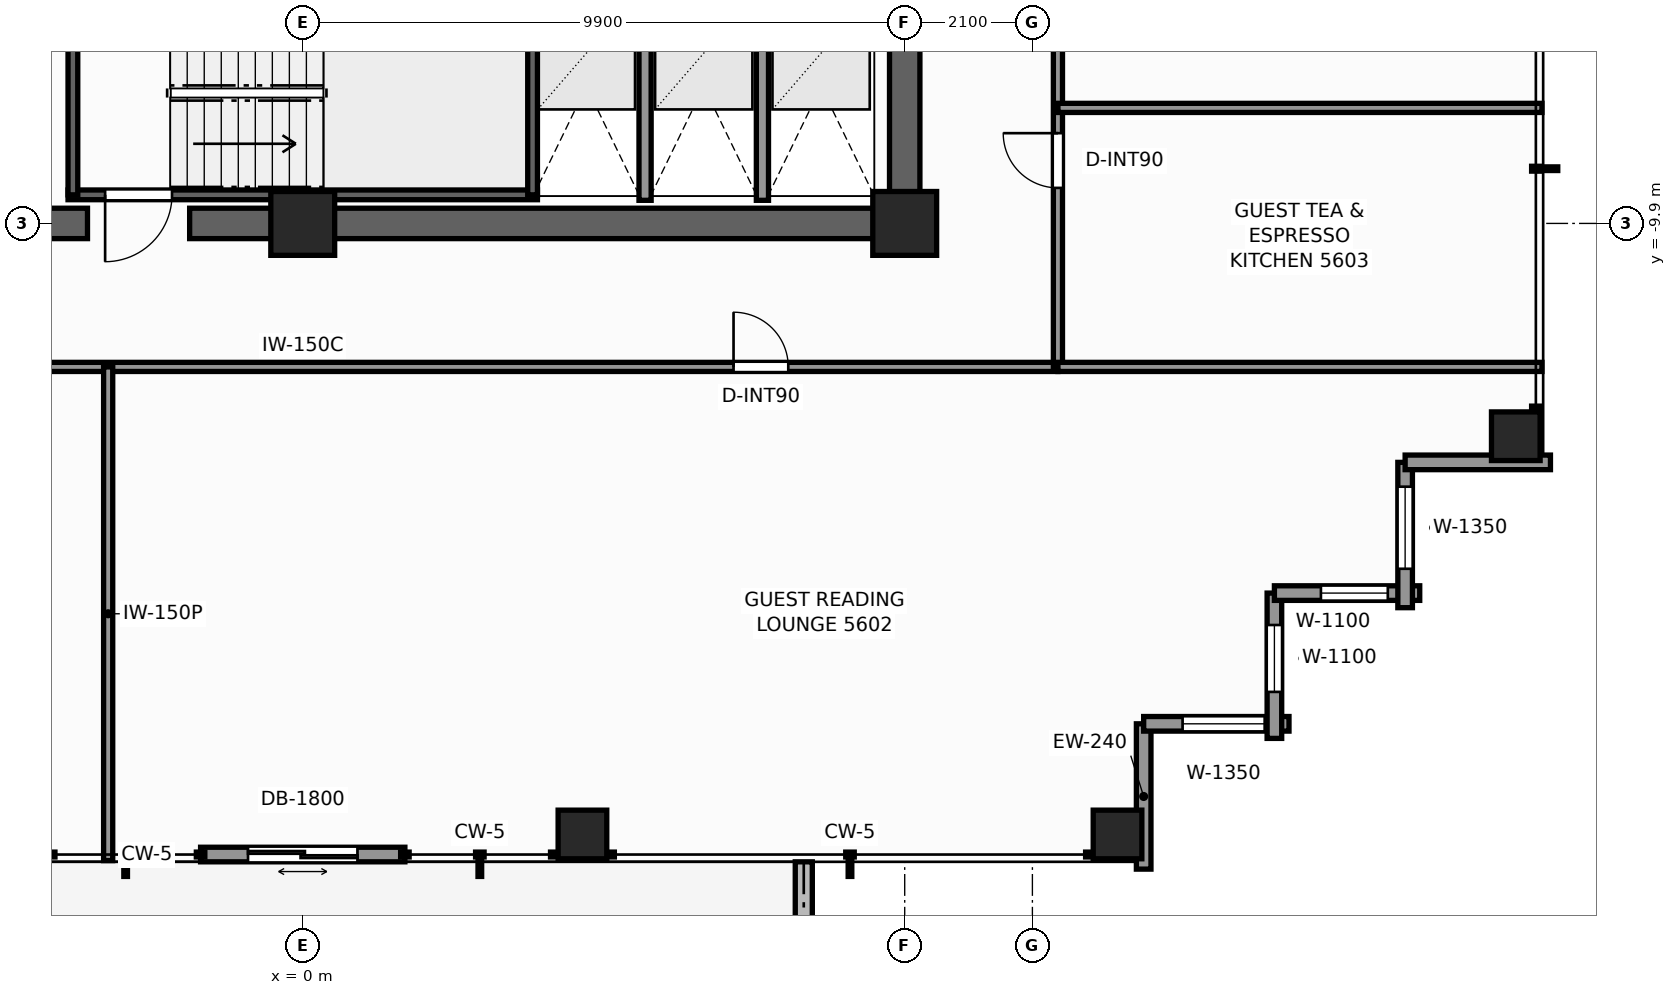
"""IFC4 building model, lengths in metres.
Left out: names, types, materials, properties, quantities, classifications, styles, units other than length and angle.
Written with IfcOpenShell. Run it as: python <this file> out.ifc"""

import sys

from ifc_helpers import new_model, si_unit, direction, frame, frame_2d, origin, origin_2d, place, context, subcontext, project, spatial, rectangle, extrude, element, fill, save


model = new_model("IFC4")
c1 = context("Model", 3, precision=1e-05, world=origin(), true_north=direction((0.0, 1.0)))
c2 = subcontext(c1, "Body", "Model", "MODEL_VIEW")
j1 = project(units=[si_unit("LENGTHUNIT", "METRE"), si_unit("PLANEANGLEUNIT", "RADIAN")], contexts=[c1])
p1 = place(None, origin())
s1 = spatial("IfcSite", under=j1, at=p1, CompositionType="ELEMENT")
p2 = place(p1, origin())
s2 = spatial("IfcBuilding", under=s1, at=p2, CompositionType="ELEMENT")
p3 = place(p2, frame((0.0, 0.0, 193.2)))
s3 = spatial("IfcBuildingStorey", under=s2, at=p3, CompositionType="ELEMENT", Elevation=193.2)
p4 = place(p3, frame((10.15, -9.9, 0.0), z_axis=(0.0, 0.0, 1.0), x_axis=(-1.0, 0.0, 0.0)))
e1 = element("IfcWall", 1, at=p4, inside=s3, PredefinedType="SHEAR", context=c2, shape_type="SweptSolid", body=[
    extrude(rectangle(XDim=12.01, YDim=0.5, at=frame_2d((6.005, 0.0))), origin(), (0.0, 0.0, 1.0), 3.3),
])
p5 = place(p3, frame((-3.54, -9.9, 0.0), z_axis=(0.0, 0.0, 1.0), x_axis=(-1.0, 0.0, 0.0)))
e2 = element("IfcWall", 2, at=p5, inside=s3, PredefinedType="SHEAR", context=c2, shape_type="SweptSolid", body=[
    extrude(rectangle(XDim=6.61, YDim=0.5, at=frame_2d((3.305, 0.0))), origin(), (0.0, 0.0, 1.0), 3.3),
])
p6 = place(p3, frame((9.9, -9.65, 0.0), z_axis=(0.0, 0.0, 1.0), x_axis=(0.0, 1.0, 0.0)))
e3 = element("IfcWall", 3, at=p6, inside=s3, PredefinedType="SHEAR", context=c2, shape_type="SweptSolid", body=[
    extrude(rectangle(XDim=4.1, YDim=0.5, at=frame_2d((2.05, 0.0))), origin(), (0.0, 0.0, 1.0), 3.3),
])
for number, where, z_axis, x_axis in (
    (4, (9.9, -9.9, 0.0), (0.0, 0.0, 1.0), (1.0, 0.0, 0.0)),
    (5, (0.0, -9.9, 0.0), (0.0, 0.0, 1.0), (1.0, 0.0, 0.0)),
):
    element("IfcColumn", number, at=place(p3, frame(where, z_axis=z_axis, x_axis=x_axis)), inside=s3, PredefinedType="COLUMN", context=c2, shape_type="SweptSolid", body=[
        extrude(rectangle(XDim=1.05, YDim=1.05, at=origin_2d()), origin(), (0.0, 0.0, 1.0), 3.3),
    ])
for number, where, z_axis, x_axis in (
    (6, (4.6, -19.95, 0.0), (0.0, 0.0, 1.0), (1.0, 0.0, 0.0)),
    (7, (13.4, -19.95, 0.0), (0.0, 0.0, 1.0), (1.0, 0.0, 0.0)),
    (8, (19.95, -13.4, 0.0), (0.0, 0.0, 1.0), (1.0, 0.0, 0.0)),
):
    element("IfcColumn", number, at=place(p3, frame(where, z_axis=z_axis, x_axis=x_axis)), inside=s3, PredefinedType="COLUMN", context=c2, shape_type="SweptSolid", body=[
        extrude(rectangle(XDim=0.8, YDim=0.8, at=origin_2d()), origin(), (0.0, 0.0, 1.0), 3.3),
    ])
p7 = place(p3, frame((8.24, -23.82, -0.04), z_axis=(0.0, 0.0, 1.0), x_axis=(0.0, 1.0, 0.0)))
e9 = element("IfcWall", 9, at=p7, inside=s3, PredefinedType="PARAPET", context=c2, shape_type="SweptSolid", body=[
    extrude(rectangle(XDim=3.42, YDim=0.28, at=frame_2d((1.71, 0.0))), origin(), (0.0, 0.0, 1.0), 0.42),
])
p8 = place(p3, frame((1.68, -20.28, 0.0), z_axis=(0.0, 0.0, 1.0), x_axis=(-1.0, 0.0, 0.0)))
e10 = element("IfcWall", 10, at=p8, inside=s3, PredefinedType="STANDARD", context=c2, shape_type="SweptSolid", body=[
    extrude(rectangle(XDim=3.36, YDim=0.24, at=frame_2d((1.68, 0.0))), origin(), (0.0, 0.0, 1.0), 3.08),
])
p9 = place(p8, frame((0.78, 0.0, 0.0)))
e11 = element("IfcOpeningElement", 11, at=p9, cuts=e10, PredefinedType="OPENING", context=c2, shape_type="SweptSolid", body=[
    extrude(rectangle(XDim=1.8, YDim=2.2, at=frame_2d((0.9, 1.1))), frame((0.0, 0.13, 0.0), z_axis=(0.0, -1.0, 0.0), x_axis=(1.0, 0.0, 0.0)), (0.0, 0.0, 1.0), 0.26),
])
p10 = place(p3, frame((13.83, -18.13, 0.0), z_axis=(0.0, 0.0, 1.0), x_axis=(0.0, -1.0, 0.0)))
e12 = element("IfcWall", 12, at=p10, inside=s3, PredefinedType="STANDARD", context=c2, shape_type="SweptSolid", body=[
    extrude(rectangle(XDim=2.39, YDim=0.24, at=frame_2d((1.195, 0.0))), origin(), (0.0, 0.0, 1.0), 2.463),
])
p11 = place(p3, frame((16.22, -18.13, 0.0), z_axis=(0.0, 0.0, 1.0), x_axis=(-1.0, 0.0, 0.0)))
e13 = element("IfcWall", 13, at=p11, inside=s3, PredefinedType="STANDARD", context=c2, shape_type="SweptSolid", body=[
    extrude(rectangle(XDim=2.39, YDim=0.24, at=frame_2d((1.195, 0.0))), origin(), (0.0, 0.0, 1.0), 2.463),
])
p12 = place(p11, frame((0.4, 0.0, 0.65)))
e14 = element("IfcOpeningElement", 14, at=p12, cuts=e13, PredefinedType="OPENING", context=c2, shape_type="SweptSolid", body=[
    extrude(rectangle(XDim=1.35, YDim=1.55, at=frame_2d((0.675, 0.775))), frame((0.0, 0.13, 0.0), z_axis=(0.0, -1.0, 0.0), x_axis=(1.0, 0.0, 0.0)), (0.0, 0.0, 1.0), 0.26),
])
p13 = place(p3, frame((15.98, -15.98, 0.0), z_axis=(0.0, 0.0, 1.0), x_axis=(0.0, -1.0, 0.0)))
e15 = element("IfcWall", 15, at=p13, inside=s3, PredefinedType="STANDARD", context=c2, shape_type="SweptSolid", body=[
    extrude(rectangle(XDim=2.39, YDim=0.24, at=frame_2d((1.195, 0.0))), origin(), (0.0, 0.0, 1.0), 2.463),
])
p14 = place(p13, frame((0.525, 0.0, 0.65)))
e16 = element("IfcOpeningElement", 16, at=p14, cuts=e15, PredefinedType="OPENING", context=c2, shape_type="SweptSolid", body=[
    extrude(rectangle(XDim=1.1, YDim=1.45, at=frame_2d((0.55, 0.725))), frame((0.0, 0.13, 0.0), z_axis=(0.0, -1.0, 0.0), x_axis=(1.0, 0.0, 0.0)), (0.0, 0.0, 1.0), 0.26),
])
p15 = place(p3, frame((18.37, -15.98, 0.0), z_axis=(0.0, 0.0, 1.0), x_axis=(-1.0, 0.0, 0.0)))
e17 = element("IfcWall", 17, at=p15, inside=s3, PredefinedType="STANDARD", context=c2, shape_type="SweptSolid", body=[
    extrude(rectangle(XDim=2.39, YDim=0.24, at=frame_2d((1.195, 0.0))), origin(), (0.0, 0.0, 1.0), 2.463),
])
p16 = place(p15, frame((0.525, 0.0, 0.65)))
e18 = element("IfcOpeningElement", 18, at=p16, cuts=e17, PredefinedType="OPENING", context=c2, shape_type="SweptSolid", body=[
    extrude(rectangle(XDim=1.1, YDim=1.45, at=frame_2d((0.55, 0.725))), frame((0.0, 0.13, 0.0), z_axis=(0.0, -1.0, 0.0), x_axis=(1.0, 0.0, 0.0)), (0.0, 0.0, 1.0), 0.26),
])
p17 = place(p3, frame((18.13, -13.83, 0.0), z_axis=(0.0, 0.0, 1.0), x_axis=(0.0, -1.0, 0.0)))
e19 = element("IfcWall", 19, at=p17, inside=s3, PredefinedType="STANDARD", context=c2, shape_type="SweptSolid", body=[
    extrude(rectangle(XDim=2.39, YDim=0.24, at=frame_2d((1.195, 0.0))), origin(), (0.0, 0.0, 1.0), 2.463),
])
p18 = place(p17, frame((0.4, 0.0, 0.65)))
e20 = element("IfcOpeningElement", 20, at=p18, cuts=e19, PredefinedType="OPENING", context=c2, shape_type="SweptSolid", body=[
    extrude(rectangle(XDim=1.35, YDim=1.55, at=frame_2d((0.675, 0.775))), frame((0.0, 0.13, 0.0), z_axis=(0.0, -1.0, 0.0), x_axis=(1.0, 0.0, 0.0)), (0.0, 0.0, 1.0), 0.26),
])
p19 = place(p3, frame((20.52, -13.83, 0.0), z_axis=(0.0, 0.0, 1.0), x_axis=(-1.0, 0.0, 0.0)))
e21 = element("IfcWall", 21, at=p19, inside=s3, PredefinedType="STANDARD", context=c2, shape_type="SweptSolid", body=[
    extrude(rectangle(XDim=2.39, YDim=0.24, at=frame_2d((1.195, 0.0))), origin(), (0.0, 0.0, 1.0), 2.463),
])
p20 = place(p3, frame((3.86, -9.43, 0.0), z_axis=(0.0, 0.0, 1.0), x_axis=(-1.0, 0.0, 0.0)))
e22 = element("IfcWall", 22, at=p20, inside=s3, PredefinedType="SHEAR", context=c2, shape_type="SweptSolid", body=[
    extrude(rectangle(XDim=7.72, YDim=0.16, at=frame_2d((3.86, 0.0))), origin(), (0.0, 0.0, 1.0), 3.3),
])
p21 = place(p20, frame((6.01, 0.0, 0.0)))
e23 = element("IfcOpeningElement", 23, at=p21, cuts=e22, PredefinedType="OPENING", context=c2, shape_type="SweptSolid", body=[
    extrude(rectangle(XDim=1.1, YDim=2.2, at=frame_2d((0.55, 1.1))), frame((0.0, 0.09, 0.0), z_axis=(0.0, -1.0, 0.0), x_axis=(1.0, 0.0, 0.0)), (0.0, 0.0, 1.0), 0.18),
])
for number, where, z_axis, x_axis in (
    (24, (-3.78, -9.43, 0.0), (0.0, 0.0, 1.0), (0.0, 1.0, 0.0)),
    (25, (3.78, -9.43, 0.0), (0.0, 0.0, 1.0), (0.0, 1.0, 0.0)),
):
    element("IfcWall", number, at=place(p3, frame(where, z_axis=z_axis, x_axis=x_axis)), inside=s3, PredefinedType="SHEAR", context=c2, shape_type="SweptSolid", body=[
        extrude(rectangle(XDim=3.35, YDim=0.16, at=frame_2d((1.675, 0.0))), origin(), (0.0, 0.0, 1.0), 3.3),
    ])
for number, where, z_axis, x_axis in (
    (26, (5.63, -9.52, 0.0), (0.0, 0.0, 1.0), (0.0, 1.0, 0.0)),
    (27, (7.56, -9.52, 0.0), (0.0, 0.0, 1.0), (0.0, 1.0, 0.0)),
):
    element("IfcWall", number, at=place(p3, frame(where, z_axis=z_axis, x_axis=x_axis)), inside=s3, PredefinedType="SOLIDWALL", context=c2, shape_type="SweptSolid", body=[
        extrude(rectangle(XDim=3.77, YDim=0.2, at=frame_2d((1.885, 0.0))), origin(), (0.0, 0.0, 1.0), 3.08),
    ])
p22 = place(p3, frame((-12.42, -12.26, 0.0), z_axis=(0.0, 0.0, 1.0), x_axis=(1.0, 0.0, 0.0)))
e28 = element("IfcWall", 28, at=p22, inside=s3, PredefinedType="PARTITIONING", context=c2, shape_type="SweptSolid", body=[
    extrude(rectangle(XDim=24.84, YDim=0.15, at=frame_2d((12.42, 0.0))), origin(), (0.0, 0.0, 1.0), 2.369),
])
p23 = place(p22, frame((4.435, 0.0, 0.0)))
e29 = element("IfcOpeningElement", 29, at=p23, cuts=e28, PredefinedType="OPENING", context=c2, shape_type="SweptSolid", body=[
    extrude(rectangle(XDim=0.9, YDim=2.06, at=frame_2d((0.45, 1.03))), frame((0.0, 0.085, 0.0), z_axis=(0.0, -1.0, 0.0), x_axis=(1.0, 0.0, 0.0)), (0.0, 0.0, 1.0), 0.17),
])
p24 = place(p22, frame((19.505, 0.0, 0.0)))
e30 = element("IfcOpeningElement", 30, at=p24, cuts=e28, PredefinedType="OPENING", context=c2, shape_type="SweptSolid", body=[
    extrude(rectangle(XDim=0.9, YDim=2.06, at=frame_2d((0.45, 1.03))), frame((0.0, 0.085, 0.0), z_axis=(0.0, -1.0, 0.0), x_axis=(1.0, 0.0, 0.0)), (0.0, 0.0, 1.0), 0.17),
])
p25 = place(p3, frame((12.42, -12.26, 0.0), z_axis=(0.0, 0.0, 1.0), x_axis=(0.0, 1.0, 0.0)))
e31 = element("IfcWall", 31, at=p25, inside=s3, PredefinedType="PARTITIONING", context=c2, shape_type="SweptSolid", body=[
    extrude(rectangle(XDim=24.84, YDim=0.15, at=frame_2d((12.42, 0.0))), origin(), (0.0, 0.0, 1.0), 2.369),
])
p26 = place(p25, frame((2.944, 0.0, 0.0)))
e32 = element("IfcOpeningElement", 32, at=p26, cuts=e31, PredefinedType="OPENING", context=c2, shape_type="SweptSolid", body=[
    extrude(rectangle(XDim=0.9, YDim=2.06, at=frame_2d((0.45, 1.03))), frame((0.0, 0.085, 0.0), z_axis=(0.0, -1.0, 0.0), x_axis=(1.0, 0.0, 0.0)), (0.0, 0.0, 1.0), 0.17),
])
p27 = place(p25, frame((5.279, 0.0, 0.0)))
e33 = element("IfcOpeningElement", 33, at=p27, cuts=e31, PredefinedType="OPENING", context=c2, shape_type="SweptSolid", body=[
    extrude(rectangle(XDim=0.9, YDim=2.06, at=frame_2d((0.45, 1.03))), frame((0.0, 0.085, 0.0), z_axis=(0.0, -1.0, 0.0), x_axis=(1.0, 0.0, 0.0)), (0.0, 0.0, 1.0), 0.17),
])
p28 = place(p25, frame((13.602, 0.0, 0.0)))
e34 = element("IfcOpeningElement", 34, at=p28, cuts=e31, PredefinedType="OPENING", context=c2, shape_type="SweptSolid", body=[
    extrude(rectangle(XDim=0.9, YDim=2.06, at=frame_2d((0.45, 1.03))), frame((0.0, 0.085, 0.0), z_axis=(0.0, -1.0, 0.0), x_axis=(1.0, 0.0, 0.0)), (0.0, 0.0, 1.0), 0.17),
])
p29 = place(p25, frame((19.098, 0.0, 0.0)))
e35 = element("IfcOpeningElement", 35, at=p29, cuts=e31, PredefinedType="OPENING", context=c2, shape_type="SweptSolid", body=[
    extrude(rectangle(XDim=0.95, YDim=2.06, at=frame_2d((0.475, 1.03))), frame((0.0, 0.085, 0.0), z_axis=(0.0, -1.0, 0.0), x_axis=(1.0, 0.0, 0.0)), (0.0, 0.0, 1.0), 0.17),
])
p30 = place(p25, frame((20.836, 0.0, 0.0)))
e36 = element("IfcOpeningElement", 36, at=p30, cuts=e31, PredefinedType="OPENING", context=c2, shape_type="SweptSolid", body=[
    extrude(rectangle(XDim=0.9, YDim=2.06, at=frame_2d((0.45, 1.03))), frame((0.0, 0.085, 0.0), z_axis=(0.0, -1.0, 0.0), x_axis=(1.0, 0.0, 0.0)), (0.0, 0.0, 1.0), 0.17),
])
p31 = place(p3, frame((12.42, -12.26, 0.0), z_axis=(0.0, 0.0, 1.0), x_axis=(1.0, 0.0, 0.0)))
e37 = element("IfcWall", 37, at=p31, inside=s3, PredefinedType="PARTITIONING", context=c2, shape_type="SweptSolid", body=[
    extrude(rectangle(XDim=7.96, YDim=0.15, at=frame_2d((3.98, 0.0))), origin(), (0.0, 0.0, 1.0), 2.369),
])
p32 = place(p3, frame((-3.2, -20.38, 0.0), z_axis=(0.0, 0.0, 1.0), x_axis=(0.0, 1.0, 0.0)))
e38 = element("IfcWall", 38, at=p32, inside=s3, PredefinedType="PARTITIONING", context=c2, shape_type="SweptSolid", body=[
    extrude(rectangle(XDim=8.12, YDim=0.15, at=frame_2d((4.06, 0.0))), origin(), (0.0, 0.0, 1.0), 2.369),
])
p33 = place(p3, frame((12.42, -8.0, 0.0), z_axis=(0.0, 0.0, 1.0), x_axis=(1.0, 0.0, 0.0)))
e39 = element("IfcWall", 39, at=p33, inside=s3, PredefinedType="PARTITIONING", context=c2, shape_type="SweptSolid", body=[
    extrude(rectangle(XDim=7.96, YDim=0.15, at=frame_2d((3.98, 0.0))), origin(), (0.0, 0.0, 1.0), 2.453),
])
p34 = place(p9, origin())
e40 = element("IfcDoor", 40, at=p34, inside=s3, OperationType="DOUBLE_DOOR_SLIDING", PredefinedType="DOOR", context=c2, shape_type="SweptSolid", body=[
    extrude(rectangle(XDim=1.8, YDim=2.2, at=frame_2d((0.9, 1.1))), frame((0.0, 0.025, 0.0), z_axis=(0.0, -1.0, 0.0), x_axis=(1.0, 0.0, 0.0)), (0.0, 0.0, 1.0), 0.05),
])
fill(e11, e40)
p35 = place(p12, origin())
e41 = element("IfcWindow", 41, at=p35, inside=s3, PartitioningType="SINGLE_PANEL", PredefinedType="WINDOW", context=c2, shape_type="SweptSolid", body=[
    extrude(rectangle(XDim=1.35, YDim=1.55, at=frame_2d((0.675, 0.775))), frame((0.0, 0.03, 0.0), z_axis=(0.0, -1.0, 0.0), x_axis=(1.0, 0.0, 0.0)), (0.0, 0.0, 1.0), 0.06),
])
fill(e14, e41)
p36 = place(p14, origin())
e42 = element("IfcWindow", 42, at=p36, inside=s3, PartitioningType="SINGLE_PANEL", PredefinedType="WINDOW", context=c2, shape_type="SweptSolid", body=[
    extrude(rectangle(XDim=1.1, YDim=1.45, at=frame_2d((0.55, 0.725))), frame((0.0, 0.03, 0.0), z_axis=(0.0, -1.0, 0.0), x_axis=(1.0, 0.0, 0.0)), (0.0, 0.0, 1.0), 0.06),
])
fill(e16, e42)
p37 = place(p16, origin())
e43 = element("IfcWindow", 43, at=p37, inside=s3, PartitioningType="SINGLE_PANEL", PredefinedType="WINDOW", context=c2, shape_type="SweptSolid", body=[
    extrude(rectangle(XDim=1.1, YDim=1.45, at=frame_2d((0.55, 0.725))), frame((0.0, 0.03, 0.0), z_axis=(0.0, -1.0, 0.0), x_axis=(1.0, 0.0, 0.0)), (0.0, 0.0, 1.0), 0.06),
])
fill(e18, e43)
p38 = place(p18, origin())
e44 = element("IfcWindow", 44, at=p38, inside=s3, PartitioningType="SINGLE_PANEL", PredefinedType="WINDOW", context=c2, shape_type="SweptSolid", body=[
    extrude(rectangle(XDim=1.35, YDim=1.55, at=frame_2d((0.675, 0.775))), frame((0.0, 0.03, 0.0), z_axis=(0.0, -1.0, 0.0), x_axis=(1.0, 0.0, 0.0)), (0.0, 0.0, 1.0), 0.06),
])
fill(e20, e44)
p39 = place(p21, origin())
e45 = element("IfcDoor", 45, at=p39, inside=s3, OperationType="SINGLE_SWING_RIGHT", PredefinedType="DOOR", context=c2, shape_type="SweptSolid", body=[
    extrude(rectangle(XDim=1.1, YDim=2.2, at=frame_2d((0.55, 1.1))), frame((0.0, 0.025, 0.0), z_axis=(0.0, -1.0, 0.0), x_axis=(1.0, 0.0, 0.0)), (0.0, 0.0, 1.0), 0.05),
])
fill(e23, e45)
p40 = place(p24, origin())
e46 = element("IfcDoor", 46, at=p40, inside=s3, OperationType="SINGLE_SWING_LEFT", PredefinedType="DOOR", context=c2, shape_type="SweptSolid", body=[
    extrude(rectangle(XDim=0.9, YDim=2.06, at=frame_2d((0.45, 1.03))), frame((0.0, 0.025, 0.0), z_axis=(0.0, -1.0, 0.0), x_axis=(1.0, 0.0, 0.0)), (0.0, 0.0, 1.0), 0.05),
])
fill(e30, e46)
p41 = place(p26, origin())
e47 = element("IfcDoor", 47, at=p41, inside=s3, OperationType="SINGLE_SWING_RIGHT", PredefinedType="DOOR", context=c2, shape_type="SweptSolid", body=[
    extrude(rectangle(XDim=0.9, YDim=2.06, at=frame_2d((0.45, 1.03))), frame((0.0, 0.025, 0.0), z_axis=(0.0, -1.0, 0.0), x_axis=(1.0, 0.0, 0.0)), (0.0, 0.0, 1.0), 0.05),
])
fill(e32, e47)
save(model, sys.argv[1])
